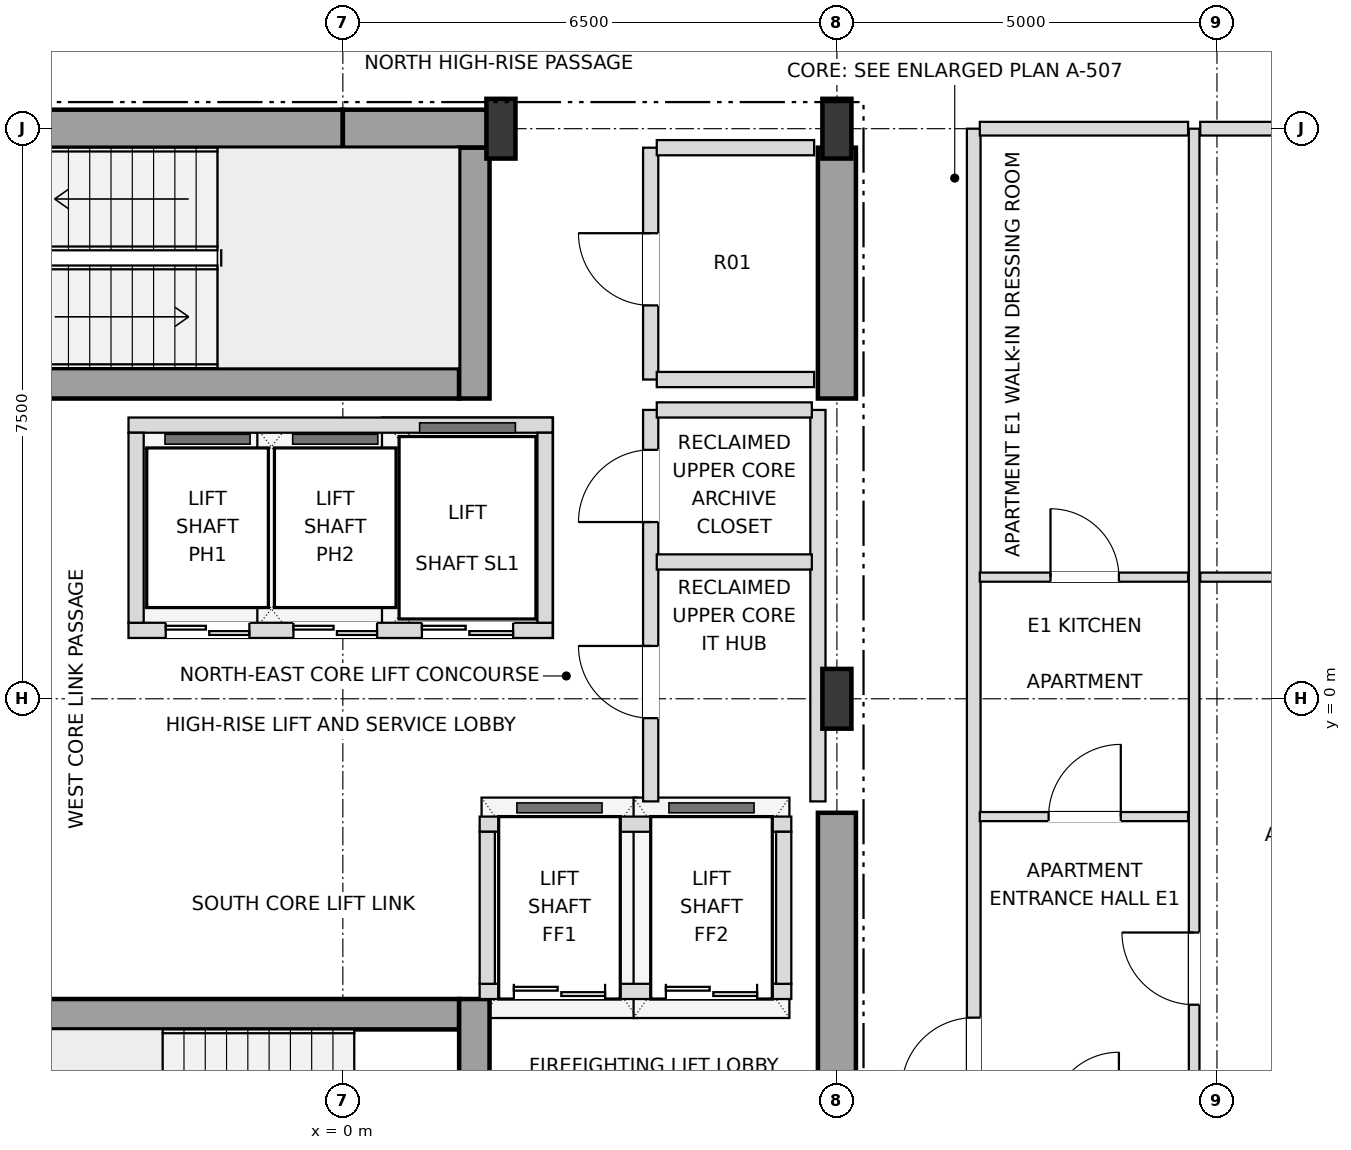
"""IFC4 building model, lengths in metres.
Left out: names, types, materials, properties, quantities, classifications, styles, units other than length and angle.
Written with IfcOpenShell. Run it as: python <this file> out.ifc"""

import sys

from ifc_helpers import new_model, si_unit, direction, frame, frame_2d, origin, origin_2d, place, context, subcontext, project, spatial, rectangle, i_section, extrude, element, fill, save


model = new_model("IFC4")
c1 = context("Model", 3, precision=1e-05, world=origin(), true_north=direction((0.0, 1.0)))
c2 = subcontext(c1, "Body", "Model", "MODEL_VIEW")
j1 = project(units=[si_unit("LENGTHUNIT", "METRE"), si_unit("PLANEANGLEUNIT", "RADIAN")], contexts=[c1])
p1 = place(None, origin())
s1 = spatial("IfcSite", under=j1, at=p1, CompositionType="ELEMENT")
p2 = place(p1, origin())
s2 = spatial("IfcBuilding", under=s1, at=p2, CompositionType="ELEMENT")
p3 = place(p2, frame((0.0, 0.0, 243.9)))
s3 = spatial("IfcBuildingStorey", under=s2, at=p3, CompositionType="ELEMENT", Elevation=243.9)
for number, where, z_axis, x_axis in (
    (1, (6.5, 0.0, 0.0), (0.0, 0.0, 1.0), (1.0, 0.0, 0.0)),
    (2, (2.08, 7.5, 0.0), (0.0, 0.0, 1.0), (1.0, 0.0, 0.0)),
    (3, (6.5, 7.5, 0.0), (0.0, 0.0, 1.0), (1.0, 0.0, 0.0)),
):
    element("IfcColumn", number, at=place(p3, frame(where, z_axis=z_axis, x_axis=x_axis)), inside=s3, PredefinedType="COLUMN", context=c2, shape_type="SweptSolid", body=[
        extrude(i_section(OverallWidth=0.382, OverallDepth=0.786, WebThickness=0.02, FlangeThickness=0.033, at=origin_2d()), origin(), (0.0, 0.0, 1.0), 3.6),
    ])
p4 = place(p3, frame((-6.75, 7.5, 0.0), z_axis=(0.0, 0.0, 1.0), x_axis=(1.0, 0.0, 0.0)))
e4 = element("IfcWall", 4, at=p4, inside=s3, PredefinedType="SHEAR", context=c2, shape_type="SweptSolid", body=[
    extrude(rectangle(XDim=6.75, YDim=0.5, at=frame_2d((3.375, 0.0))), origin(), (0.0, 0.0, 1.0), 3.38),
])
p5 = place(p4, frame((1.65, 0.0, 0.0)))
e5 = element("IfcOpeningElement", 5, at=p5, cuts=e4, PredefinedType="OPENING", context=c2, shape_type="SweptSolid", body=[
    extrude(rectangle(XDim=1.05, YDim=2.15, at=frame_2d((0.525, 1.075))), frame((0.0, 0.26, 0.0), z_axis=(0.0, -1.0, 0.0), x_axis=(1.0, 0.0, 0.0)), (0.0, 0.0, 1.0), 0.52),
])
p6 = place(p3, frame((0.0, 7.5, 0.0), z_axis=(0.0, 0.0, 1.0), x_axis=(1.0, 0.0, 0.0)))
e6 = element("IfcWall", 6, at=p6, inside=s3, PredefinedType="SHEAR", context=c2, shape_type="SweptSolid", body=[
    extrude(rectangle(XDim=2.08, YDim=0.5, at=frame_2d((1.04, 0.0))), origin(), (0.0, 0.0, 1.0), 3.38),
])
p7 = place(p3, frame((6.5, -7.25, 0.0), z_axis=(0.0, 0.0, 1.0), x_axis=(0.0, 1.0, 0.0)))
e7 = element("IfcWall", 7, at=p7, inside=s3, PredefinedType="SHEAR", context=c2, shape_type="SweptSolid", body=[
    extrude(rectangle(XDim=5.75, YDim=0.5, at=frame_2d((2.875, 0.0))), origin(), (0.0, 0.0, 1.0), 3.38),
])
p8 = place(p7, frame((0.85, 0.0, 0.0)))
e8 = element("IfcOpeningElement", 8, at=p8, cuts=e7, PredefinedType="OPENING", context=c2, shape_type="SweptSolid", body=[
    extrude(rectangle(XDim=1.05, YDim=2.15, at=frame_2d((0.525, 1.075))), frame((0.0, 0.26, 0.0), z_axis=(0.0, -1.0, 0.0), x_axis=(1.0, 0.0, 0.0)), (0.0, 0.0, 1.0), 0.52),
])
p9 = place(p3, frame((6.5, 3.95, 0.0), z_axis=(0.0, 0.0, 1.0), x_axis=(0.0, 1.0, 0.0)))
e9 = element("IfcWall", 9, at=p9, inside=s3, PredefinedType="SHEAR", context=c2, shape_type="SweptSolid", body=[
    extrude(rectangle(XDim=3.3, YDim=0.5, at=frame_2d((1.65, 0.0))), origin(), (0.0, 0.0, 1.0), 3.38),
])
p10 = place(p3, frame((-6.25, -4.15, 0.0), z_axis=(0.0, 0.0, 1.0), x_axis=(1.0, 0.0, 0.0)))
e10 = element("IfcWall", 10, at=p10, inside=s3, PredefinedType="SHEAR", context=c2, shape_type="SweptSolid", body=[
    extrude(rectangle(XDim=7.78, YDim=0.4, at=frame_2d((3.89, 0.0))), origin(), (0.0, 0.0, 1.0), 3.38),
])
p11 = place(p3, frame((1.73, -7.25, 0.0), z_axis=(0.0, 0.0, 1.0), x_axis=(0.0, 1.0, 0.0)))
e11 = element("IfcWall", 11, at=p11, inside=s3, PredefinedType="SHEAR", context=c2, shape_type="SweptSolid", body=[
    extrude(rectangle(XDim=3.3, YDim=0.4, at=frame_2d((1.65, 0.0))), origin(), (0.0, 0.0, 1.0), 3.38),
])
p12 = place(p11, frame((0.9, 0.0, 0.0)))
e12 = element("IfcOpeningElement", 12, at=p12, cuts=e11, PredefinedType="OPENING", context=c2, shape_type="SweptSolid", body=[
    extrude(rectangle(XDim=1.05, YDim=2.15, at=frame_2d((0.525, 1.075))), frame((0.0, 0.21, 0.0), z_axis=(0.0, -1.0, 0.0), x_axis=(1.0, 0.0, 0.0)), (0.0, 0.0, 1.0), 0.42),
])
p13 = place(p3, frame((-5.55, 4.15, 0.0), z_axis=(0.0, 0.0, 1.0), x_axis=(1.0, 0.0, 0.0)))
e13 = element("IfcWall", 13, at=p13, inside=s3, PredefinedType="SHEAR", context=c2, shape_type="SweptSolid", body=[
    extrude(rectangle(XDim=7.08, YDim=0.4, at=frame_2d((3.54, 0.0))), origin(), (0.0, 0.0, 1.0), 3.38),
])
p14 = place(p3, frame((1.73, 3.95, 0.0), z_axis=(0.0, 0.0, 1.0), x_axis=(0.0, 1.0, 0.0)))
e14 = element("IfcWall", 14, at=p14, inside=s3, PredefinedType="SHEAR", context=c2, shape_type="SweptSolid", body=[
    extrude(rectangle(XDim=3.3, YDim=0.4, at=frame_2d((1.65, 0.0))), origin(), (0.0, 0.0, 1.0), 3.38),
])
p15 = place(p3, frame((-2.82, 0.9, 0.0), z_axis=(0.0, 0.0, 1.0), x_axis=(1.0, 0.0, 0.0)))
e15 = element("IfcWall", 15, at=p15, inside=s3, PredefinedType="SOLIDWALL", context=c2, shape_type="SweptSolid", body=[
    extrude(rectangle(XDim=5.58, YDim=0.2, at=frame_2d((2.79, 0.0))), origin(), (0.0, 0.0, 1.0), 3.38),
])
p16 = place(p15, frame((0.49, 0.0, 0.0)))
e16 = element("IfcOpeningElement", 16, at=p16, cuts=e15, PredefinedType="OPENING", context=c2, shape_type="SweptSolid", body=[
    extrude(rectangle(XDim=1.1, YDim=2.15, at=frame_2d((0.55, 1.075))), frame((0.0, 0.11, 0.0), z_axis=(0.0, -1.0, 0.0), x_axis=(1.0, 0.0, 0.0)), (0.0, 0.0, 1.0), 0.22),
])
p17 = place(p15, frame((2.17, 0.0, 0.0)))
e17 = element("IfcOpeningElement", 17, at=p17, cuts=e15, PredefinedType="OPENING", context=c2, shape_type="SweptSolid", body=[
    extrude(rectangle(XDim=1.1, YDim=2.15, at=frame_2d((0.55, 1.075))), frame((0.0, 0.11, 0.0), z_axis=(0.0, -1.0, 0.0), x_axis=(1.0, 0.0, 0.0)), (0.0, 0.0, 1.0), 0.22),
])
p18 = place(p15, frame((3.86, 0.0, 0.0)))
e18 = element("IfcOpeningElement", 18, at=p18, cuts=e15, PredefinedType="OPENING", context=c2, shape_type="SweptSolid", body=[
    extrude(rectangle(XDim=1.2, YDim=2.2, at=frame_2d((0.6, 1.1))), frame((0.0, 0.11, 0.0), z_axis=(0.0, -1.0, 0.0), x_axis=(1.0, 0.0, 0.0)), (0.0, 0.0, 1.0), 0.22),
])
p19 = place(p3, frame((-2.82, 3.6, 0.0), z_axis=(0.0, 0.0, 1.0), x_axis=(1.0, 0.0, 0.0)))
e19 = element("IfcWall", 19, at=p19, inside=s3, PredefinedType="SOLIDWALL", context=c2, shape_type="SweptSolid", body=[
    extrude(rectangle(XDim=5.58, YDim=0.2, at=frame_2d((2.79, 0.0))), origin(), (0.0, 0.0, 1.0), 3.38),
])
for number, where, z_axis, x_axis in (
    (20, (-2.72, 1.0, 0.0), (0.0, 0.0, 1.0), (0.0, 1.0, 0.0)),
    (21, (2.66, 1.0, 0.0), (0.0, 0.0, 1.0), (0.0, 1.0, 0.0)),
):
    element("IfcWall", number, at=place(p3, frame(where, z_axis=z_axis, x_axis=x_axis)), inside=s3, PredefinedType="SOLIDWALL", context=c2, shape_type="SweptSolid", body=[
        extrude(rectangle(XDim=2.5, YDim=0.2, at=frame_2d((1.25, 0.0))), origin(), (0.0, 0.0, 1.0), 3.38),
    ])
p20 = place(p3, frame((1.8, -3.85, 0.0), z_axis=(0.0, 0.0, 1.0), x_axis=(1.0, 0.0, 0.0)))
e22 = element("IfcWall", 22, at=p20, inside=s3, PredefinedType="SOLIDWALL", context=c2, shape_type="SweptSolid", body=[
    extrude(rectangle(XDim=4.1, YDim=0.2, at=frame_2d((2.05, 0.0))), origin(), (0.0, 0.0, 1.0), 3.38),
])
p21 = place(p20, frame((0.45, 0.0, 0.0)))
e23 = element("IfcOpeningElement", 23, at=p21, cuts=e22, PredefinedType="OPENING", context=c2, shape_type="SweptSolid", body=[
    extrude(rectangle(XDim=1.2, YDim=2.2, at=frame_2d((0.6, 1.1))), frame((0.0, 0.11, 0.0), z_axis=(0.0, -1.0, 0.0), x_axis=(1.0, 0.0, 0.0)), (0.0, 0.0, 1.0), 0.22),
])
p22 = place(p20, frame((2.45, 0.0, 0.0)))
e24 = element("IfcOpeningElement", 24, at=p22, cuts=e22, PredefinedType="OPENING", context=c2, shape_type="SweptSolid", body=[
    extrude(rectangle(XDim=1.2, YDim=2.2, at=frame_2d((0.6, 1.1))), frame((0.0, 0.11, 0.0), z_axis=(0.0, -1.0, 0.0), x_axis=(1.0, 0.0, 0.0)), (0.0, 0.0, 1.0), 0.22),
])
p23 = place(p3, frame((1.8, -1.65, 0.0), z_axis=(0.0, 0.0, 1.0), x_axis=(1.0, 0.0, 0.0)))
e25 = element("IfcWall", 25, at=p23, inside=s3, PredefinedType="SOLIDWALL", context=c2, shape_type="SweptSolid", body=[
    extrude(rectangle(XDim=4.1, YDim=0.2, at=frame_2d((2.05, 0.0))), origin(), (0.0, 0.0, 1.0), 3.38),
])
for number, where, z_axis, x_axis in (
    (26, (1.9, -3.75, 0.0), (0.0, 0.0, 1.0), (0.0, 1.0, 0.0)),
    (27, (5.8, -3.75, 0.0), (0.0, 0.0, 1.0), (0.0, 1.0, 0.0)),
):
    element("IfcWall", number, at=place(p3, frame(where, z_axis=z_axis, x_axis=x_axis)), inside=s3, PredefinedType="SOLIDWALL", context=c2, shape_type="SweptSolid", body=[
        extrude(rectangle(XDim=2.0, YDim=0.2, at=frame_2d((1.0, 0.0))), origin(), (0.0, 0.0, 1.0), 3.38),
    ])
p24 = place(p3, frame((4.05, -1.35, 0.0), z_axis=(0.0, 0.0, 1.0), x_axis=(0.0, 1.0, 0.0)))
e28 = element("IfcWall", 28, at=p24, inside=s3, PredefinedType="SOLIDWALL", context=c2, shape_type="SweptSolid", body=[
    extrude(rectangle(XDim=5.15, YDim=0.2, at=frame_2d((2.575, 0.0))), origin(), (0.0, 0.0, 1.0), 3.38),
])
p25 = place(p24, frame((1.095, 0.0, 0.0)))
e29 = element("IfcOpeningElement", 29, at=p25, cuts=e28, PredefinedType="OPENING", context=c2, shape_type="SweptSolid", body=[
    extrude(rectangle(XDim=0.95, YDim=2.15, at=frame_2d((0.475, 1.075))), frame((0.0, 0.11, 0.0), z_axis=(0.0, -1.0, 0.0), x_axis=(1.0, 0.0, 0.0)), (0.0, 0.0, 1.0), 0.22),
])
p26 = place(p24, frame((3.675, 0.0, 0.0)))
e30 = element("IfcOpeningElement", 30, at=p26, cuts=e28, PredefinedType="OPENING", context=c2, shape_type="SweptSolid", body=[
    extrude(rectangle(XDim=0.95, YDim=2.15, at=frame_2d((0.475, 1.075))), frame((0.0, 0.11, 0.0), z_axis=(0.0, -1.0, 0.0), x_axis=(1.0, 0.0, 0.0)), (0.0, 0.0, 1.0), 0.22),
])
p27 = place(p3, frame((4.05, 4.2, 0.0), z_axis=(0.0, 0.0, 1.0), x_axis=(0.0, 1.0, 0.0)))
e31 = element("IfcWall", 31, at=p27, inside=s3, PredefinedType="SOLIDWALL", context=c2, shape_type="SweptSolid", body=[
    extrude(rectangle(XDim=3.05, YDim=0.2, at=frame_2d((1.525, 0.0))), origin(), (0.0, 0.0, 1.0), 3.38),
])
p28 = place(p27, frame((0.975, 0.0, 0.0)))
e32 = element("IfcOpeningElement", 32, at=p28, cuts=e31, PredefinedType="OPENING", context=c2, shape_type="SweptSolid", body=[
    extrude(rectangle(XDim=0.95, YDim=2.15, at=frame_2d((0.475, 1.075))), frame((0.0, 0.11, 0.0), z_axis=(0.0, -1.0, 0.0), x_axis=(1.0, 0.0, 0.0)), (0.0, 0.0, 1.0), 0.22),
])
p29 = place(p3, frame((6.25, -1.35, 0.0), z_axis=(0.0, 0.0, 1.0), x_axis=(0.0, 1.0, 0.0)))
e33 = element("IfcWall", 33, at=p29, inside=s3, PredefinedType="SOLIDWALL", context=c2, shape_type="SweptSolid", body=[
    extrude(rectangle(XDim=5.15, YDim=0.2, at=frame_2d((2.575, 0.0))), origin(), (0.0, 0.0, 1.0), 3.38),
])
p30 = place(p3, frame((8.3, -7.5, 0.0), z_axis=(0.0, 0.0, 1.0), x_axis=(0.0, 1.0, 0.0)))
e34 = element("IfcWall", 34, at=p30, inside=s3, PredefinedType="PARTITIONING", context=c2, shape_type="SweptSolid", body=[
    extrude(rectangle(XDim=15.0, YDim=0.18, at=frame_2d((7.5, 0.0))), origin(), (0.0, 0.0, 1.0), 3.38),
])
p31 = place(p30, frame((2.355, 0.0, 0.0)))
e35 = element("IfcOpeningElement", 35, at=p31, cuts=e34, PredefinedType="OPENING", context=c2, shape_type="SweptSolid", body=[
    extrude(rectangle(XDim=0.95, YDim=2.15, at=frame_2d((0.475, 1.075))), frame((0.0, 0.1, 0.0), z_axis=(0.0, -1.0, 0.0), x_axis=(1.0, 0.0, 0.0)), (0.0, 0.0, 1.0), 0.2),
])
p32 = place(p3, frame((11.2, -7.5, 0.0), z_axis=(0.0, 0.0, 1.0), x_axis=(0.0, 1.0, 0.0)))
e36 = element("IfcWall", 36, at=p32, inside=s3, PredefinedType="PARTITIONING", context=c2, shape_type="SweptSolid", body=[
    extrude(rectangle(XDim=15.0, YDim=0.14, at=frame_2d((7.5, 0.0))), origin(), (0.0, 0.0, 1.0), 3.38),
])
p33 = place(p32, frame((3.475, 0.0, 0.0)))
e37 = element("IfcOpeningElement", 37, at=p33, cuts=e36, PredefinedType="OPENING", context=c2, shape_type="SweptSolid", body=[
    extrude(rectangle(XDim=0.95, YDim=2.1, at=frame_2d((0.475, 1.05))), frame((0.0, 0.08, 0.0), z_axis=(0.0, -1.0, 0.0), x_axis=(1.0, 0.0, 0.0)), (0.0, 0.0, 1.0), 0.16),
])
p34 = place(p3, frame((8.38, -1.55, 0.0), z_axis=(0.0, 0.0, 1.0), x_axis=(1.0, 0.0, 0.0)))
e38 = element("IfcWall", 38, at=p34, inside=s3, PredefinedType="PARTITIONING", context=c2, shape_type="SweptSolid", body=[
    extrude(rectangle(XDim=2.74, YDim=0.12, at=frame_2d((1.37, 0.0))), origin(), (0.0, 0.0, 1.0), 3.38),
])
p35 = place(p34, frame((0.905, 0.0, 0.0)))
e39 = element("IfcOpeningElement", 39, at=p35, cuts=e38, PredefinedType="OPENING", context=c2, shape_type="SweptSolid", body=[
    extrude(rectangle(XDim=0.95, YDim=2.1, at=frame_2d((0.475, 1.05))), frame((0.0, 0.07, 0.0), z_axis=(0.0, -1.0, 0.0), x_axis=(1.0, 0.0, 0.0)), (0.0, 0.0, 1.0), 0.14),
])
p36 = place(p3, frame((8.38, 1.6, 0.0), z_axis=(0.0, 0.0, 1.0), x_axis=(1.0, 0.0, 0.0)))
e40 = element("IfcWall", 40, at=p36, inside=s3, PredefinedType="PARTITIONING", context=c2, shape_type="SweptSolid", body=[
    extrude(rectangle(XDim=2.74, YDim=0.12, at=frame_2d((1.37, 0.0))), origin(), (0.0, 0.0, 1.0), 3.38),
])
p37 = place(p36, frame((0.93, 0.0, 0.0)))
e41 = element("IfcOpeningElement", 41, at=p37, cuts=e40, PredefinedType="OPENING", context=c2, shape_type="SweptSolid", body=[
    extrude(rectangle(XDim=0.9, YDim=2.1, at=frame_2d((0.45, 1.05))), frame((0.0, 0.07, 0.0), z_axis=(0.0, -1.0, 0.0), x_axis=(1.0, 0.0, 0.0)), (0.0, 0.0, 1.0), 0.14),
])
p38 = place(p3, frame((11.28, 1.6, 0.0), z_axis=(0.0, 0.0, 1.0), x_axis=(1.0, 0.0, 0.0)))
e42 = element("IfcWall", 42, at=p38, inside=s3, PredefinedType="PARTITIONING", context=c2, shape_type="SweptSolid", body=[
    extrude(rectangle(XDim=5.54, YDim=0.12, at=frame_2d((2.77, 0.0))), origin(), (0.0, 0.0, 1.0), 3.018),
])
p39 = place(p38, frame((2.33, 0.0, 0.0)))
e43 = element("IfcOpeningElement", 43, at=p39, cuts=e42, PredefinedType="OPENING", context=c2, shape_type="SweptSolid", body=[
    extrude(rectangle(XDim=0.9, YDim=2.1, at=frame_2d((0.45, 1.05))), frame((0.0, 0.07, 0.0), z_axis=(0.0, -1.0, 0.0), x_axis=(1.0, 0.0, 0.0)), (0.0, 0.0, 1.0), 0.14),
])
for number, where, z_axis, x_axis in (
    (44, (4.13, 1.8, 0.0), (0.0, 0.0, 1.0), (1.0, 0.0, 0.0)),
    (45, (4.13, 3.8, 0.0), (0.0, 0.0, 1.0), (1.0, 0.0, 0.0)),
):
    element("IfcWall", number, at=place(p3, frame(where, z_axis=z_axis, x_axis=x_axis)), inside=s3, PredefinedType="SOLIDWALL", context=c2, shape_type="SweptSolid", body=[
        extrude(rectangle(XDim=2.04, YDim=0.2, at=frame_2d((1.02, 0.0))), origin(), (0.0, 0.0, 1.0), 3.38),
    ])
for number, where, z_axis, x_axis in (
    (46, (4.13, 4.2, 0.0), (0.0, 0.0, 1.0), (1.0, 0.0, 0.0)),
    (47, (4.13, 7.25, 0.0), (0.0, 0.0, 1.0), (1.0, 0.0, 0.0)),
):
    element("IfcWall", number, at=place(p3, frame(where, z_axis=z_axis, x_axis=x_axis)), inside=s3, PredefinedType="SOLIDWALL", context=c2, shape_type="SweptSolid", body=[
        extrude(rectangle(XDim=2.07, YDim=0.2, at=frame_2d((1.035, 0.0))), origin(), (0.0, 0.0, 1.0), 3.38),
    ])
p40 = place(p3, frame((8.38, 7.5, 0.0), z_axis=(0.0, 0.0, 1.0), x_axis=(1.0, 0.0, 0.0)))
e48 = element("IfcWall", 48, at=p40, inside=s3, PredefinedType="PARTITIONING", context=c2, shape_type="SweptSolid", body=[
    extrude(rectangle(XDim=2.74, YDim=0.18, at=frame_2d((1.37, 0.0))), origin(), (0.0, 0.0, 1.0), 2.826),
])
p41 = place(p3, frame((11.28, 7.5, 0.0), z_axis=(0.0, 0.0, 1.0), x_axis=(1.0, 0.0, 0.0)))
e49 = element("IfcWall", 49, at=p41, inside=s3, PredefinedType="PARTITIONING", context=c2, shape_type="SweptSolid", body=[
    extrude(rectangle(XDim=5.62, YDim=0.18, at=frame_2d((2.81, 0.0))), origin(), (0.0, 0.0, 1.0), 2.826),
])
p42 = place(p16, origin())
e50 = element("IfcDoor", 50, at=p42, inside=s3, OperationType="DOUBLE_DOOR_SLIDING", PredefinedType="DOOR", context=c2, shape_type="SweptSolid", body=[
    extrude(rectangle(XDim=1.1, YDim=2.15, at=frame_2d((0.55, 1.075))), frame((0.0, 0.025, 0.0), z_axis=(0.0, -1.0, 0.0), x_axis=(1.0, 0.0, 0.0)), (0.0, 0.0, 1.0), 0.05),
])
fill(e16, e50)
p43 = place(p17, origin())
e51 = element("IfcDoor", 51, at=p43, inside=s3, OperationType="DOUBLE_DOOR_SLIDING", PredefinedType="DOOR", context=c2, shape_type="SweptSolid", body=[
    extrude(rectangle(XDim=1.1, YDim=2.15, at=frame_2d((0.55, 1.075))), frame((0.0, 0.025, 0.0), z_axis=(0.0, -1.0, 0.0), x_axis=(1.0, 0.0, 0.0)), (0.0, 0.0, 1.0), 0.05),
])
fill(e17, e51)
p44 = place(p18, origin())
e52 = element("IfcDoor", 52, at=p44, inside=s3, OperationType="DOUBLE_DOOR_SLIDING", PredefinedType="DOOR", context=c2, shape_type="SweptSolid", body=[
    extrude(rectangle(XDim=1.2, YDim=2.2, at=frame_2d((0.6, 1.1))), frame((0.0, 0.025, 0.0), z_axis=(0.0, -1.0, 0.0), x_axis=(1.0, 0.0, 0.0)), (0.0, 0.0, 1.0), 0.05),
])
fill(e18, e52)
p45 = place(p21, origin())
e53 = element("IfcDoor", 53, at=p45, inside=s3, OperationType="DOUBLE_DOOR_SLIDING", PredefinedType="DOOR", context=c2, shape_type="SweptSolid", body=[
    extrude(rectangle(XDim=1.2, YDim=2.2, at=frame_2d((0.6, 1.1))), frame((0.0, 0.025, 0.0), z_axis=(0.0, -1.0, 0.0), x_axis=(1.0, 0.0, 0.0)), (0.0, 0.0, 1.0), 0.05),
])
fill(e23, e53)
p46 = place(p22, origin())
e54 = element("IfcDoor", 54, at=p46, inside=s3, OperationType="DOUBLE_DOOR_SLIDING", PredefinedType="DOOR", context=c2, shape_type="SweptSolid", body=[
    extrude(rectangle(XDim=1.2, YDim=2.2, at=frame_2d((0.6, 1.1))), frame((0.0, 0.025, 0.0), z_axis=(0.0, -1.0, 0.0), x_axis=(1.0, 0.0, 0.0)), (0.0, 0.0, 1.0), 0.05),
])
fill(e24, e54)
p47 = place(p25, origin())
e55 = element("IfcDoor", 55, at=p47, inside=s3, OperationType="SINGLE_SWING_RIGHT", PredefinedType="DOOR", context=c2, shape_type="SweptSolid", body=[
    extrude(rectangle(XDim=0.95, YDim=2.15, at=frame_2d((0.475, 1.075))), frame((0.0, 0.025, 0.0), z_axis=(0.0, -1.0, 0.0), x_axis=(1.0, 0.0, 0.0)), (0.0, 0.0, 1.0), 0.05),
])
fill(e29, e55)
p48 = place(p26, origin())
e56 = element("IfcDoor", 56, at=p48, inside=s3, OperationType="SINGLE_SWING_LEFT", PredefinedType="DOOR", context=c2, shape_type="SweptSolid", body=[
    extrude(rectangle(XDim=0.95, YDim=2.15, at=frame_2d((0.475, 1.075))), frame((0.0, 0.025, 0.0), z_axis=(0.0, -1.0, 0.0), x_axis=(1.0, 0.0, 0.0)), (0.0, 0.0, 1.0), 0.05),
])
fill(e30, e56)
p49 = place(p28, origin())
e57 = element("IfcDoor", 57, at=p49, inside=s3, OperationType="SINGLE_SWING_RIGHT", PredefinedType="DOOR", context=c2, shape_type="SweptSolid", body=[
    extrude(rectangle(XDim=0.95, YDim=2.15, at=frame_2d((0.475, 1.075))), frame((0.0, 0.025, 0.0), z_axis=(0.0, -1.0, 0.0), x_axis=(1.0, 0.0, 0.0)), (0.0, 0.0, 1.0), 0.05),
])
fill(e32, e57)
p50 = place(p31, origin())
e58 = element("IfcDoor", 58, at=p50, inside=s3, OperationType="SINGLE_SWING_LEFT", PredefinedType="DOOR", context=c2, shape_type="SweptSolid", body=[
    extrude(rectangle(XDim=0.95, YDim=2.15, at=frame_2d((0.475, 1.075))), frame((0.0, 0.025, 0.0), z_axis=(0.0, -1.0, 0.0), x_axis=(1.0, 0.0, 0.0)), (0.0, 0.0, 1.0), 0.05),
])
fill(e35, e58)
p51 = place(p35, origin())
e59 = element("IfcDoor", 59, at=p51, inside=s3, OperationType="SINGLE_SWING_RIGHT", PredefinedType="DOOR", context=c2, shape_type="SweptSolid", body=[
    extrude(rectangle(XDim=0.95, YDim=2.1, at=frame_2d((0.475, 1.05))), frame((0.0, 0.025, 0.0), z_axis=(0.0, -1.0, 0.0), x_axis=(1.0, 0.0, 0.0)), (0.0, 0.0, 1.0), 0.05),
])
fill(e39, e59)
p52 = place(p37, origin())
e60 = element("IfcDoor", 60, at=p52, inside=s3, OperationType="SINGLE_SWING_LEFT", PredefinedType="DOOR", context=c2, shape_type="SweptSolid", body=[
    extrude(rectangle(XDim=0.9, YDim=2.1, at=frame_2d((0.45, 1.05))), frame((0.0, 0.025, 0.0), z_axis=(0.0, -1.0, 0.0), x_axis=(1.0, 0.0, 0.0)), (0.0, 0.0, 1.0), 0.05),
])
fill(e41, e60)
p53 = place(p33, origin())
e61 = element("IfcDoor", 61, at=p53, inside=s3, OperationType="SINGLE_SWING_RIGHT", PredefinedType="DOOR", context=c2, shape_type="SweptSolid", body=[
    extrude(rectangle(XDim=0.95, YDim=2.1, at=frame_2d((0.475, 1.05))), frame((0.0, 0.025, 0.0), z_axis=(0.0, -1.0, 0.0), x_axis=(1.0, 0.0, 0.0)), (0.0, 0.0, 1.0), 0.05),
])
fill(e37, e61)
save(model, sys.argv[1])
